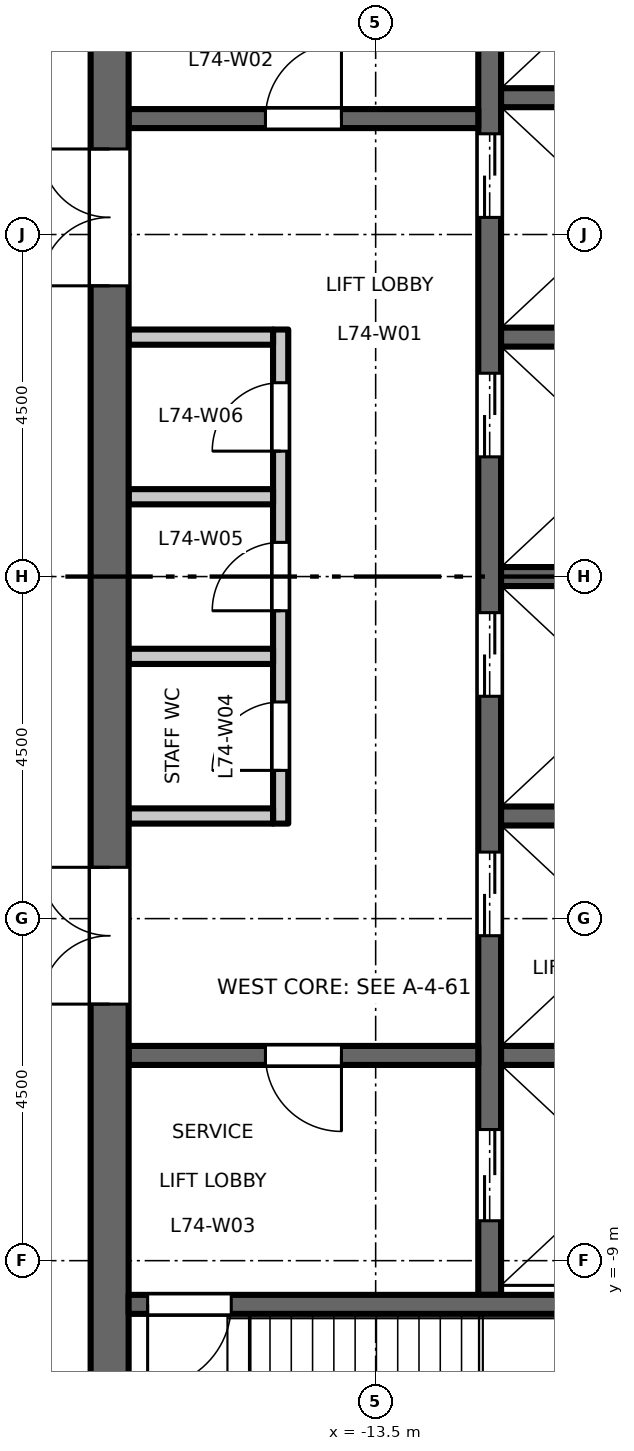
"""IFC4 building model, lengths in metres.
Left out: names, types, materials, properties, quantities, classifications, styles, units other than length and angle.
Written with IfcOpenShell. Run it as: python <this file> out.ifc"""

import sys

from ifc_helpers import new_model, si_unit, direction, frame, frame_2d, origin, place, context, subcontext, project, spatial, rectangle, extrude, element, fill, save


model = new_model("IFC4")
c1 = context("Model", 3, precision=1e-05, world=origin(), true_north=direction((0.0, 1.0)))
c2 = subcontext(c1, "Body", "Model", "MODEL_VIEW")
j1 = project(units=[si_unit("LENGTHUNIT", "METRE"), si_unit("PLANEANGLEUNIT", "RADIAN")], contexts=[c1])
p1 = place(None, origin())
s1 = spatial("IfcSite", under=j1, at=p1, CompositionType="ELEMENT")
p2 = place(p1, origin())
s2 = spatial("IfcBuilding", under=s1, at=p2, CompositionType="ELEMENT")
p3 = place(p2, frame((0.0, 0.0, 343.7)))
s3 = spatial("IfcBuildingStorey", under=s2, at=p3, CompositionType="ELEMENT", Elevation=343.7)
p4 = place(p3, frame((-14.75, -3.25, 0.0), z_axis=(0.0, 0.0, 1.0), x_axis=(0.0, 1.0, 0.0)))
e1 = element("IfcWall", 1, at=p4, inside=s3, PredefinedType="PARTITIONING", context=c2, shape_type="SweptSolid", body=[
    extrude(rectangle(XDim=6.5, YDim=0.2, at=frame_2d((3.25, 0.0))), origin(), (0.0, 0.0, 1.0), 4.3),
])
p5 = place(p4, frame((0.7, 0.0, 0.0)))
e2 = element("IfcOpeningElement", 2, at=p5, cuts=e1, PredefinedType="OPENING", context=c2, shape_type="SweptSolid", body=[
    extrude(rectangle(XDim=0.9, YDim=2.1, at=frame_2d((0.45, 1.05))), frame((0.0, 0.11, 0.0), z_axis=(0.0, -1.0, 0.0), x_axis=(1.0, 0.0, 0.0)), (0.0, 0.0, 1.0), 0.22),
])
p6 = place(p4, frame((2.8, 0.0, 0.0)))
e3 = element("IfcOpeningElement", 3, at=p6, cuts=e1, PredefinedType="OPENING", context=c2, shape_type="SweptSolid", body=[
    extrude(rectangle(XDim=0.9, YDim=2.1, at=frame_2d((0.45, 1.05))), frame((0.0, 0.11, 0.0), z_axis=(0.0, -1.0, 0.0), x_axis=(1.0, 0.0, 0.0)), (0.0, 0.0, 1.0), 0.22),
])
p7 = place(p4, frame((4.9, 0.0, 0.0)))
e4 = element("IfcOpeningElement", 4, at=p7, cuts=e1, PredefinedType="OPENING", context=c2, shape_type="SweptSolid", body=[
    extrude(rectangle(XDim=0.9, YDim=2.1, at=frame_2d((0.45, 1.05))), frame((0.0, 0.11, 0.0), z_axis=(0.0, -1.0, 0.0), x_axis=(1.0, 0.0, 0.0)), (0.0, 0.0, 1.0), 0.22),
])
for number, where, z_axis, x_axis in (
    (5, (-14.85, 3.15, 0.0), (0.0, 0.0, 1.0), (-1.0, 0.0, 0.0)),
    (6, (-14.85, -3.15, 0.0), (0.0, 0.0, 1.0), (-1.0, 0.0, 0.0)),
    (7, (-14.85, -1.05, 0.0), (0.0, 0.0, 1.0), (-1.0, 0.0, 0.0)),
    (8, (-14.85, 1.05, 0.0), (0.0, 0.0, 1.0), (-1.0, 0.0, 0.0)),
):
    element("IfcWall", number, at=place(p3, frame(where, z_axis=z_axis, x_axis=x_axis)), inside=s3, PredefinedType="PARTITIONING", context=c2, shape_type="SweptSolid", body=[
        extrude(rectangle(XDim=1.9, YDim=0.2, at=frame_2d((0.95, 0.0))), origin(), (0.0, 0.0, 1.0), 4.3),
    ])
p8 = place(p3, frame((-12.0, -9.45, 0.0), z_axis=(0.0, 0.0, 1.0), x_axis=(0.0, 1.0, 0.0)))
e9 = element("IfcWall", 9, at=p8, inside=s3, PredefinedType="SHEAR", context=c2, shape_type="SweptSolid", body=[
    extrude(rectangle(XDim=18.9, YDim=0.3, at=frame_2d((9.45, 0.0))), origin(), (0.0, 0.0, 1.0), 4.3),
])
p9 = place(p8, frame((4.725, 0.0, 0.0)))
e10 = element("IfcOpeningElement", 10, at=p9, cuts=e9, PredefinedType="OPENING", context=c2, shape_type="SweptSolid", body=[
    extrude(rectangle(XDim=1.1, YDim=2.1, at=frame_2d((0.55, 1.05))), frame((0.0, 0.16, 0.0), z_axis=(0.0, -1.0, 0.0), x_axis=(1.0, 0.0, 0.0)), (0.0, 0.0, 1.0), 0.32),
])
p10 = place(p8, frame((7.875, 0.0, 0.0)))
e11 = element("IfcOpeningElement", 11, at=p10, cuts=e9, PredefinedType="OPENING", context=c2, shape_type="SweptSolid", body=[
    extrude(rectangle(XDim=1.1, YDim=2.1, at=frame_2d((0.55, 1.05))), frame((0.0, 0.16, 0.0), z_axis=(0.0, -1.0, 0.0), x_axis=(1.0, 0.0, 0.0)), (0.0, 0.0, 1.0), 0.32),
])
p11 = place(p8, frame((11.025, 0.0, 0.0)))
e12 = element("IfcOpeningElement", 12, at=p11, cuts=e9, PredefinedType="OPENING", context=c2, shape_type="SweptSolid", body=[
    extrude(rectangle(XDim=1.1, YDim=2.1, at=frame_2d((0.55, 1.05))), frame((0.0, 0.16, 0.0), z_axis=(0.0, -1.0, 0.0), x_axis=(1.0, 0.0, 0.0)), (0.0, 0.0, 1.0), 0.32),
])
p12 = place(p8, frame((14.175, 0.0, 0.0)))
e13 = element("IfcOpeningElement", 13, at=p12, cuts=e9, PredefinedType="OPENING", context=c2, shape_type="SweptSolid", body=[
    extrude(rectangle(XDim=1.1, YDim=2.1, at=frame_2d((0.55, 1.05))), frame((0.0, 0.16, 0.0), z_axis=(0.0, -1.0, 0.0), x_axis=(1.0, 0.0, 0.0)), (0.0, 0.0, 1.0), 0.32),
])
p13 = place(p8, frame((16.725, 0.0, 0.0)))
e14 = element("IfcOpeningElement", 14, at=p13, cuts=e9, PredefinedType="OPENING", context=c2, shape_type="SweptSolid", body=[
    extrude(rectangle(XDim=1.2, YDim=2.1, at=frame_2d((0.6, 1.05))), frame((0.0, 0.16, 0.0), z_axis=(0.0, -1.0, 0.0), x_axis=(1.0, 0.0, 0.0)), (0.0, 0.0, 1.0), 0.32),
])
p14 = place(p8, frame((0.975, 0.0, 0.0)))
e15 = element("IfcOpeningElement", 15, at=p14, cuts=e9, PredefinedType="OPENING", context=c2, shape_type="SweptSolid", body=[
    extrude(rectangle(XDim=1.2, YDim=2.1, at=frame_2d((0.6, 1.05))), frame((0.0, 0.16, 0.0), z_axis=(0.0, -1.0, 0.0), x_axis=(1.0, 0.0, 0.0)), (0.0, 0.0, 1.0), 0.32),
])
p15 = place(p3, frame((-12.15, 6.025, 0.0), z_axis=(0.0, 0.0, 1.0), x_axis=(-1.0, 0.0, 0.0)))
e16 = element("IfcWall", 16, at=p15, inside=s3, PredefinedType="SHEAR", context=c2, shape_type="SweptSolid", body=[
    extrude(rectangle(XDim=4.6, YDim=0.25, at=frame_2d((2.3, 0.0))), origin(), (0.0, 0.0, 1.0), 4.3),
])
p16 = place(p15, frame((1.8, 0.0, 0.0)))
e17 = element("IfcOpeningElement", 17, at=p16, cuts=e16, PredefinedType="OPENING", context=c2, shape_type="SweptSolid", body=[
    extrude(rectangle(XDim=1.0, YDim=2.1, at=frame_2d((0.5, 1.05))), frame((0.0, 0.135, 0.0), z_axis=(0.0, -1.0, 0.0), x_axis=(1.0, 0.0, 0.0)), (0.0, 0.0, 1.0), 0.27),
])
p17 = place(p3, frame((-12.15, -6.3, 0.0), z_axis=(0.0, 0.0, 1.0), x_axis=(-1.0, 0.0, 0.0)))
e18 = element("IfcWall", 18, at=p17, inside=s3, PredefinedType="SHEAR", context=c2, shape_type="SweptSolid", body=[
    extrude(rectangle(XDim=4.6, YDim=0.25, at=frame_2d((2.3, 0.0))), origin(), (0.0, 0.0, 1.0), 4.3),
])
p18 = place(p17, frame((1.8, 0.0, 0.0)))
e19 = element("IfcOpeningElement", 19, at=p18, cuts=e18, PredefinedType="OPENING", context=c2, shape_type="SweptSolid", body=[
    extrude(rectangle(XDim=1.0, YDim=2.1, at=frame_2d((0.5, 1.05))), frame((0.0, 0.135, 0.0), z_axis=(0.0, -1.0, 0.0), x_axis=(1.0, 0.0, 0.0)), (0.0, 0.0, 1.0), 0.27),
])
p19 = place(p3, frame((-17.0, -13.0, 0.0), z_axis=(0.0, 0.0, 1.0), x_axis=(0.0, 1.0, 0.0)))
e20 = element("IfcWall", 20, at=p19, inside=s3, PredefinedType="SHEAR", context=c2, shape_type="SweptSolid", body=[
    extrude(rectangle(XDim=26.0, YDim=0.5, at=frame_2d((13.0, 0.0))), origin(), (0.0, 0.0, 1.0), 4.3),
])
p20 = place(p19, frame((16.825, 0.0, 0.0)))
e21 = element("IfcOpeningElement", 21, at=p20, cuts=e20, PredefinedType="OPENING", context=c2, shape_type="SweptSolid", body=[
    extrude(rectangle(XDim=1.8, YDim=2.1, at=frame_2d((0.9, 1.05))), frame((0.0, 0.26, 0.0), z_axis=(0.0, -1.0, 0.0), x_axis=(1.0, 0.0, 0.0)), (0.0, 0.0, 1.0), 0.52),
])
p21 = place(p19, frame((7.375, 0.0, 0.0)))
e22 = element("IfcOpeningElement", 22, at=p21, cuts=e20, PredefinedType="OPENING", context=c2, shape_type="SweptSolid", body=[
    extrude(rectangle(XDim=1.8, YDim=2.1, at=frame_2d((0.9, 1.05))), frame((0.0, 0.26, 0.0), z_axis=(0.0, -1.0, 0.0), x_axis=(1.0, 0.0, 0.0)), (0.0, 0.0, 1.0), 0.52),
])
for number, where, z_axis, x_axis in (
    (23, (-8.75, 0.0, 0.0), (0.0, 0.0, 1.0), (-1.0, 0.0, 0.0)),
    (24, (-8.75, 3.15, 0.0), (0.0, 0.0, 1.0), (-1.0, 0.0, 0.0)),
    (25, (-8.75, 6.3, 0.0), (0.0, 0.0, 1.0), (-1.0, 0.0, 0.0)),
    (26, (-8.75, -3.15, 0.0), (0.0, 0.0, 1.0), (-1.0, 0.0, 0.0)),
    (27, (-8.75, -6.3, 0.0), (0.0, 0.0, 1.0), (-1.0, 0.0, 0.0)),
):
    element("IfcWall", number, at=place(p3, frame(where, z_axis=z_axis, x_axis=x_axis)), inside=s3, PredefinedType="SHEAR", context=c2, shape_type="SweptSolid", body=[
        extrude(rectangle(XDim=3.1, YDim=0.25, at=frame_2d((1.55, 0.0))), origin(), (0.0, 0.0, 1.0), 4.3),
    ])
p22 = place(p3, frame((-8.75, -9.575, 0.0), z_axis=(0.0, 0.0, 1.0), x_axis=(-1.0, 0.0, 0.0)))
e28 = element("IfcWall", 28, at=p22, inside=s3, PredefinedType="SHEAR", context=c2, shape_type="SweptSolid", body=[
    extrude(rectangle(XDim=8.0, YDim=0.25, at=frame_2d((4.0, 0.0))), origin(), (0.0, 0.0, 1.0), 4.3),
])
p23 = place(p22, frame((6.65, 0.0, 0.0)))
e29 = element("IfcOpeningElement", 29, at=p23, cuts=e28, PredefinedType="OPENING", context=c2, shape_type="SweptSolid", body=[
    extrude(rectangle(XDim=1.1, YDim=2.1, at=frame_2d((0.55, 1.05))), frame((0.0, 0.135, 0.0), z_axis=(0.0, -1.0, 0.0), x_axis=(1.0, 0.0, 0.0)), (0.0, 0.0, 1.0), 0.27),
])
p24 = place(p16, origin())
e30 = element("IfcDoor", 30, at=p24, inside=s3, OperationType="SINGLE_SWING_LEFT", PredefinedType="DOOR", context=c2, shape_type="SweptSolid", body=[
    extrude(rectangle(XDim=1.0, YDim=2.1, at=frame_2d((0.5, 1.05))), frame((0.0, 0.025, 0.0), z_axis=(0.0, -1.0, 0.0), x_axis=(1.0, 0.0, 0.0)), (0.0, 0.0, 1.0), 0.05),
])
fill(e17, e30)
p25 = place(p18, origin())
e31 = element("IfcDoor", 31, at=p25, inside=s3, OperationType="SINGLE_SWING_RIGHT", PredefinedType="DOOR", context=c2, shape_type="SweptSolid", body=[
    extrude(rectangle(XDim=1.0, YDim=2.1, at=frame_2d((0.5, 1.05))), frame((0.0, 0.025, 0.0), z_axis=(0.0, -1.0, 0.0), x_axis=(1.0, 0.0, 0.0)), (0.0, 0.0, 1.0), 0.05),
])
fill(e19, e31)
p26 = place(p23, origin())
e32 = element("IfcDoor", 32, at=p26, inside=s3, OperationType="SINGLE_SWING_LEFT", PredefinedType="DOOR", context=c2, shape_type="SweptSolid", body=[
    extrude(rectangle(XDim=1.1, YDim=2.1, at=frame_2d((0.55, 1.05))), frame((0.0, 0.025, 0.0), z_axis=(0.0, -1.0, 0.0), x_axis=(1.0, 0.0, 0.0)), (0.0, 0.0, 1.0), 0.05),
])
fill(e29, e32)
p27 = place(p20, origin())
e33 = element("IfcDoor", 33, at=p27, inside=s3, OperationType="DOUBLE_DOOR_DOUBLE_SWING", PredefinedType="DOOR", context=c2, shape_type="SweptSolid", body=[
    extrude(rectangle(XDim=1.8, YDim=2.1, at=frame_2d((0.9, 1.05))), frame((0.0, 0.025, 0.0), z_axis=(0.0, -1.0, 0.0), x_axis=(1.0, 0.0, 0.0)), (0.0, 0.0, 1.0), 0.05),
])
fill(e21, e33)
p28 = place(p21, origin())
e34 = element("IfcDoor", 34, at=p28, inside=s3, OperationType="DOUBLE_DOOR_DOUBLE_SWING", PredefinedType="DOOR", context=c2, shape_type="SweptSolid", body=[
    extrude(rectangle(XDim=1.8, YDim=2.1, at=frame_2d((0.9, 1.05))), frame((0.0, 0.025, 0.0), z_axis=(0.0, -1.0, 0.0), x_axis=(1.0, 0.0, 0.0)), (0.0, 0.0, 1.0), 0.05),
])
fill(e22, e34)
p29 = place(p9, origin())
e35 = element("IfcDoor", 35, at=p29, inside=s3, OperationType="DOUBLE_DOOR_SLIDING", PredefinedType="DOOR", context=c2, shape_type="SweptSolid", body=[
    extrude(rectangle(XDim=1.1, YDim=2.1, at=frame_2d((0.55, 1.05))), frame((0.0, 0.025, 0.0), z_axis=(0.0, -1.0, 0.0), x_axis=(1.0, 0.0, 0.0)), (0.0, 0.0, 1.0), 0.05),
])
fill(e10, e35)
p30 = place(p10, origin())
e36 = element("IfcDoor", 36, at=p30, inside=s3, OperationType="DOUBLE_DOOR_SLIDING", PredefinedType="DOOR", context=c2, shape_type="SweptSolid", body=[
    extrude(rectangle(XDim=1.1, YDim=2.1, at=frame_2d((0.55, 1.05))), frame((0.0, 0.025, 0.0), z_axis=(0.0, -1.0, 0.0), x_axis=(1.0, 0.0, 0.0)), (0.0, 0.0, 1.0), 0.05),
])
fill(e11, e36)
p31 = place(p11, origin())
e37 = element("IfcDoor", 37, at=p31, inside=s3, OperationType="DOUBLE_DOOR_SLIDING", PredefinedType="DOOR", context=c2, shape_type="SweptSolid", body=[
    extrude(rectangle(XDim=1.1, YDim=2.1, at=frame_2d((0.55, 1.05))), frame((0.0, 0.025, 0.0), z_axis=(0.0, -1.0, 0.0), x_axis=(1.0, 0.0, 0.0)), (0.0, 0.0, 1.0), 0.05),
])
fill(e12, e37)
p32 = place(p12, origin())
e38 = element("IfcDoor", 38, at=p32, inside=s3, OperationType="DOUBLE_DOOR_SLIDING", PredefinedType="DOOR", context=c2, shape_type="SweptSolid", body=[
    extrude(rectangle(XDim=1.1, YDim=2.1, at=frame_2d((0.55, 1.05))), frame((0.0, 0.025, 0.0), z_axis=(0.0, -1.0, 0.0), x_axis=(1.0, 0.0, 0.0)), (0.0, 0.0, 1.0), 0.05),
])
fill(e13, e38)
p33 = place(p14, origin())
e39 = element("IfcDoor", 39, at=p33, inside=s3, OperationType="DOUBLE_DOOR_SLIDING", PredefinedType="DOOR", context=c2, shape_type="SweptSolid", body=[
    extrude(rectangle(XDim=1.2, YDim=2.1, at=frame_2d((0.6, 1.05))), frame((0.0, 0.025, 0.0), z_axis=(0.0, -1.0, 0.0), x_axis=(1.0, 0.0, 0.0)), (0.0, 0.0, 1.0), 0.05),
])
fill(e15, e39)
p34 = place(p5, origin())
e40 = element("IfcDoor", 40, at=p34, inside=s3, OperationType="SINGLE_SWING_RIGHT", PredefinedType="DOOR", context=c2, shape_type="SweptSolid", body=[
    extrude(rectangle(XDim=0.9, YDim=2.1, at=frame_2d((0.45, 1.05))), frame((0.0, 0.025, 0.0), z_axis=(0.0, -1.0, 0.0), x_axis=(1.0, 0.0, 0.0)), (0.0, 0.0, 1.0), 0.05),
])
fill(e2, e40)
p35 = place(p6, origin())
e41 = element("IfcDoor", 41, at=p35, inside=s3, OperationType="SINGLE_SWING_RIGHT", PredefinedType="DOOR", context=c2, shape_type="SweptSolid", body=[
    extrude(rectangle(XDim=0.9, YDim=2.1, at=frame_2d((0.45, 1.05))), frame((0.0, 0.025, 0.0), z_axis=(0.0, -1.0, 0.0), x_axis=(1.0, 0.0, 0.0)), (0.0, 0.0, 1.0), 0.05),
])
fill(e3, e41)
p36 = place(p7, origin())
e42 = element("IfcDoor", 42, at=p36, inside=s3, OperationType="SINGLE_SWING_RIGHT", PredefinedType="DOOR", context=c2, shape_type="SweptSolid", body=[
    extrude(rectangle(XDim=0.9, YDim=2.1, at=frame_2d((0.45, 1.05))), frame((0.0, 0.025, 0.0), z_axis=(0.0, -1.0, 0.0), x_axis=(1.0, 0.0, 0.0)), (0.0, 0.0, 1.0), 0.05),
])
fill(e4, e42)
save(model, sys.argv[1])
